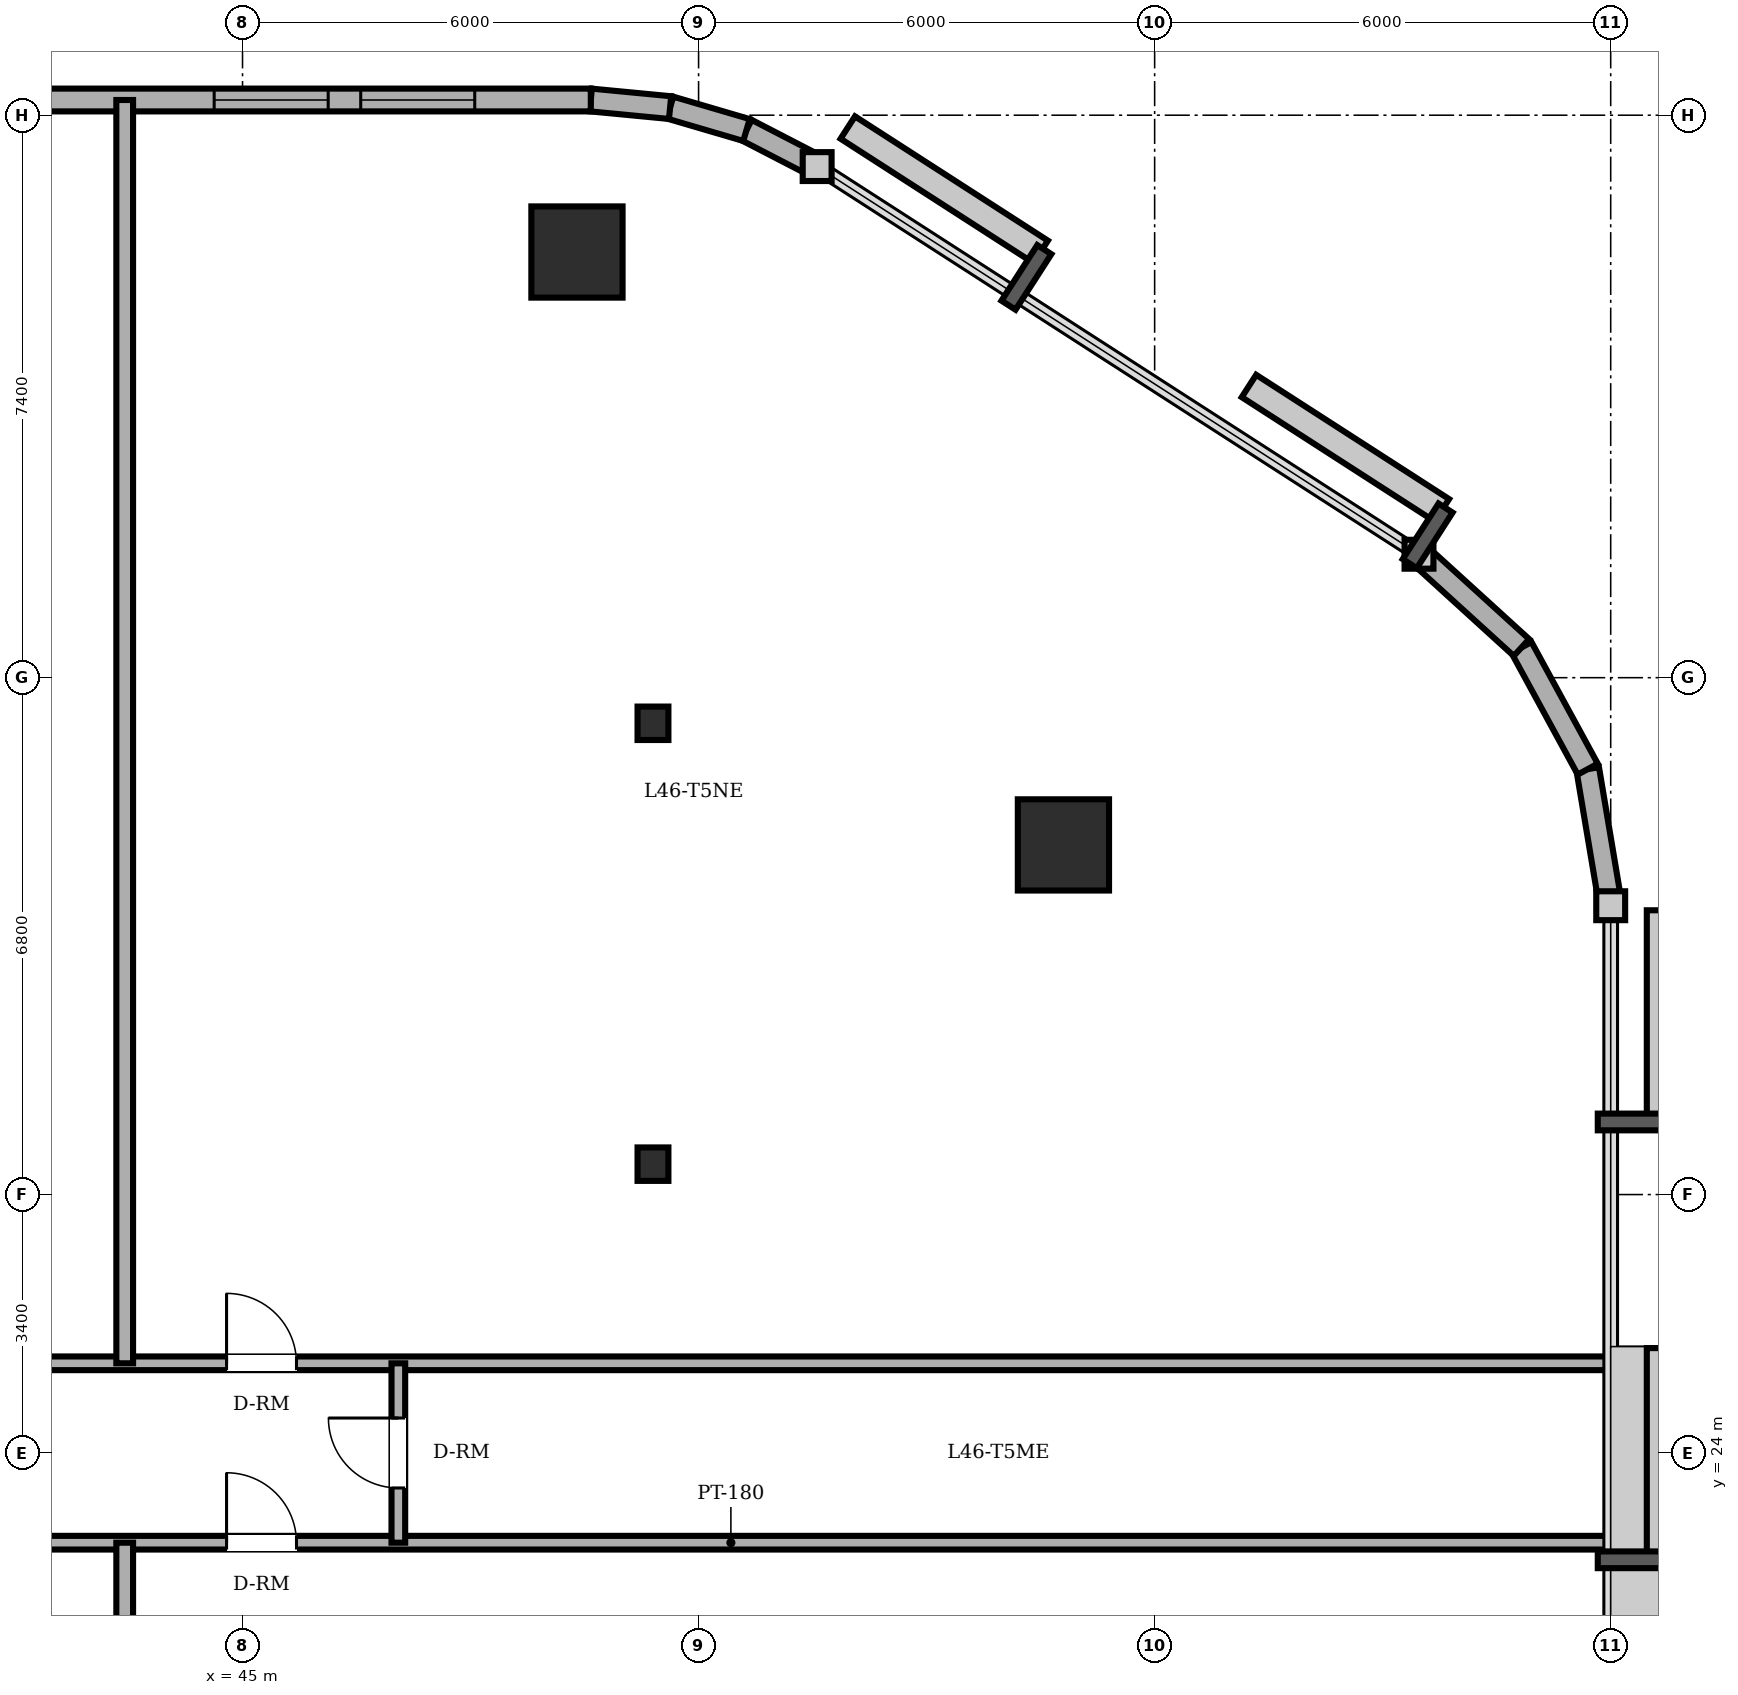
"""IFC4 building model, lengths in metres.
Left out: names, types, materials, properties, quantities, classifications, styles, units other than length and angle.
Written with IfcOpenShell. Run it as: python <this file> out.ifc"""

import sys

from ifc_helpers import new_model, si_unit, direction, frame, frame_2d, origin, origin_2d, place, context, subcontext, project, spatial, rectangle, circle, i_section, extrude, element, fill, save


model = new_model("IFC4")
c1 = context("Model", 3, precision=1e-05, world=origin(), true_north=direction((0.0, 1.0)))
c2 = subcontext(c1, "Body", "Model", "MODEL_VIEW")
j1 = project(units=[si_unit("LENGTHUNIT", "METRE"), si_unit("PLANEANGLEUNIT", "RADIAN")], contexts=[c1])
p1 = place(None, origin())
s1 = spatial("IfcSite", under=j1, at=p1, CompositionType="ELEMENT")
p2 = place(p1, origin())
s2 = spatial("IfcBuilding", under=s1, at=p2, CompositionType="ELEMENT")
p3 = place(p2, frame((0.0, 0.0, 176.2)))
s3 = spatial("IfcBuildingStorey", under=s2, at=p3, CompositionType="ELEMENT", Elevation=176.2)
for number, where, z_axis, x_axis in (
    (1, (55.8, 32.0, 0.0), (0.0, 0.0, 1.0), (1.0, 0.0, 0.0)),
    (2, (49.4, 39.8, 0.0), (0.0, 0.0, 1.0), (1.0, 0.0, 0.0)),
):
    element("IfcColumn", number, at=place(p3, frame(where, z_axis=z_axis, x_axis=x_axis)), inside=s3, PredefinedType="COLUMN", context=c2, shape_type="SweptSolid", body=[
        extrude(circle(Radius=0.6, at=origin_2d()), origin(), (0.0, 0.0, 1.0), 3.6),
    ])
for number, where, z_axis, x_axis in (
    (3, (50.4, 27.8, 0.0), (0.0, 0.0, 1.0), (1.0, 0.0, 0.0)),
    (4, (50.4, 33.6, 0.0), (0.0, 0.0, 1.0), (1.0, 0.0, 0.0)),
):
    element("IfcColumn", number, at=place(p3, frame(where, z_axis=z_axis, x_axis=x_axis)), inside=s3, PredefinedType="COLUMN", context=c2, shape_type="SweptSolid", body=[
        extrude(i_section(OverallWidth=0.406, OverallDepth=0.44, WebThickness=0.024, FlangeThickness=0.039, FilletRadius=0.015, at=origin_2d()), origin(), (0.0, 0.0, 1.0), 3.6),
    ])
p4 = place(p3, frame((63.0, 31.2, 0.0), z_axis=(0.0, 0.0, 1.0), x_axis=(-0.165724081207, 0.986172159873, 0.0)))
e5 = element("IfcWall", 5, at=p4, inside=s3, PredefinedType="SOLIDWALL", context=c2, shape_type="SweptSolid", body=[
    extrude(rectangle(XDim=1.822, YDim=0.3, at=frame_2d((0.911, 0.0))), origin(), (0.0, 0.0, 1.0), 3.4),
])
p5 = place(p3, frame((62.698, 32.997, 0.0), z_axis=(0.0, 0.0, 1.0), x_axis=(-0.478608030646, 0.878028674362, 0.0)))
e6 = element("IfcWall", 6, at=p5, inside=s3, PredefinedType="SOLIDWALL", context=c2, shape_type="SweptSolid", body=[
    extrude(rectangle(XDim=1.822, YDim=0.3, at=frame_2d((0.911, 0.0))), origin(), (0.0, 0.0, 1.0), 3.4),
])
p6 = place(p3, frame((61.826, 34.597, 0.0), z_axis=(0.0, 0.0, 1.0), x_axis=(-0.73947929393, 0.673179302897, 0.0)))
e7 = element("IfcWall", 7, at=p6, inside=s3, PredefinedType="SOLIDWALL", context=c2, shape_type="SweptSolid", body=[
    extrude(rectangle(XDim=1.823, YDim=0.3, at=frame_2d((0.911, 0.0))), origin(), (0.0, 0.0, 1.0), 3.4),
])
p7 = place(p3, frame((52.56, 40.924, 0.0), z_axis=(0.0, 0.0, 1.0), x_axis=(-0.888283247196, 0.459296062198, 0.0)))
e8 = element("IfcWall", 8, at=p7, inside=s3, PredefinedType="SOLIDWALL", context=c2, shape_type="SweptSolid", body=[
    extrude(rectangle(XDim=1.047, YDim=0.3, at=frame_2d((0.523, 0.0))), origin(), (0.0, 0.0, 1.0), 3.4),
])
p8 = place(p3, frame((51.63, 41.405, 0.0), z_axis=(0.0, 0.0, 1.0), x_axis=(-0.959528674476, 0.281610942363, 0.0)))
e9 = element("IfcWall", 9, at=p8, inside=s3, PredefinedType="SOLIDWALL", context=c2, shape_type="SweptSolid", body=[
    extrude(rectangle(XDim=1.047, YDim=0.3, at=frame_2d((0.524, 0.0))), origin(), (0.0, 0.0, 1.0), 3.4),
])
p9 = place(p3, frame((50.625, 41.7, 0.0), z_axis=(0.0, 0.0, 1.0), x_axis=(-0.995426089968, 0.095534807324, 0.0)))
e10 = element("IfcWall", 10, at=p9, inside=s3, PredefinedType="SOLIDWALL", context=c2, shape_type="SweptSolid", body=[
    extrude(rectangle(XDim=1.048, YDim=0.3, at=frame_2d((0.524, 0.0))), origin(), (0.0, 0.0, 1.0), 3.4),
])
p10 = place(p3, frame((49.582, 41.8, 0.0), z_axis=(0.0, 0.0, 1.0), x_axis=(-1.0, 0.0, 0.0)))
e11 = element("IfcWall", 11, at=p10, inside=s3, PredefinedType="SOLIDWALL", context=c2, shape_type="SweptSolid", body=[
    extrude(rectangle(XDim=30.282, YDim=0.3, at=frame_2d((15.141, 0.0))), origin(), (0.0, 0.0, 1.0), 3.4),
])
p11 = place(p10, frame((25.407, 0.0, 0.0)))
e12 = element("IfcOpeningElement", 12, at=p11, cuts=e11, PredefinedType="OPENING", context=c2, shape_type="SweptSolid", body=[
    extrude(rectangle(XDim=0.95, YDim=2.2, at=frame_2d((0.475, 1.1))), frame((0.0, 0.16, 0.0), z_axis=(0.0, -1.0, 0.0), x_axis=(1.0, 0.0, 0.0)), (0.0, 0.0, 1.0), 0.32),
])
p12 = place(p10, frame((1.527, 0.0, 0.85)))
e13 = element("IfcOpeningElement", 13, at=p12, cuts=e11, PredefinedType="OPENING", context=c2, shape_type="SweptSolid", body=[
    extrude(rectangle(XDim=1.5, YDim=1.55, at=frame_2d((0.75, 0.775))), frame((0.0, 0.16, 0.0), z_axis=(0.0, -1.0, 0.0), x_axis=(1.0, 0.0, 0.0)), (0.0, 0.0, 1.0), 0.32),
])
p13 = place(p10, frame((3.455, 0.0, 0.85)))
e14 = element("IfcOpeningElement", 14, at=p13, cuts=e11, PredefinedType="OPENING", context=c2, shape_type="SweptSolid", body=[
    extrude(rectangle(XDim=1.5, YDim=1.55, at=frame_2d((0.75, 0.775))), frame((0.0, 0.16, 0.0), z_axis=(0.0, -1.0, 0.0), x_axis=(1.0, 0.0, 0.0)), (0.0, 0.0, 1.0), 0.32),
])
p14 = place(p10, frame((7.182, 0.0, 0.85)))
e15 = element("IfcOpeningElement", 15, at=p14, cuts=e11, PredefinedType="OPENING", context=c2, shape_type="SweptSolid", body=[
    extrude(rectangle(XDim=1.5, YDim=1.55, at=frame_2d((0.75, 0.775))), frame((0.0, 0.16, 0.0), z_axis=(0.0, -1.0, 0.0), x_axis=(1.0, 0.0, 0.0)), (0.0, 0.0, 1.0), 0.32),
])
p15 = place(p10, frame((11.665, 0.0, 0.85)))
e16 = element("IfcOpeningElement", 16, at=p15, cuts=e11, PredefinedType="OPENING", context=c2, shape_type="SweptSolid", body=[
    extrude(rectangle(XDim=1.5, YDim=1.55, at=frame_2d((0.75, 0.775))), frame((0.0, 0.16, 0.0), z_axis=(0.0, -1.0, 0.0), x_axis=(1.0, 0.0, 0.0)), (0.0, 0.0, 1.0), 0.32),
])
p16 = place(p10, frame((14.349, 0.0, 0.85)))
e17 = element("IfcOpeningElement", 17, at=p16, cuts=e11, PredefinedType="OPENING", context=c2, shape_type="SweptSolid", body=[
    extrude(rectangle(XDim=1.5, YDim=1.55, at=frame_2d((0.75, 0.775))), frame((0.0, 0.16, 0.0), z_axis=(0.0, -1.0, 0.0), x_axis=(1.0, 0.0, 0.0)), (0.0, 0.0, 1.0), 0.32),
])
p17 = place(p10, frame((18.932, 0.0, 0.85)))
e18 = element("IfcOpeningElement", 18, at=p17, cuts=e11, PredefinedType="OPENING", context=c2, shape_type="SweptSolid", body=[
    extrude(rectangle(XDim=1.5, YDim=1.55, at=frame_2d((0.75, 0.775))), frame((0.0, 0.16, 0.0), z_axis=(0.0, -1.0, 0.0), x_axis=(1.0, 0.0, 0.0)), (0.0, 0.0, 1.0), 0.32),
])
p18 = place(p10, frame((22.532, 0.0, 0.85)))
e19 = element("IfcOpeningElement", 19, at=p18, cuts=e11, PredefinedType="OPENING", context=c2, shape_type="SweptSolid", body=[
    extrude(rectangle(XDim=1.5, YDim=1.55, at=frame_2d((0.75, 0.775))), frame((0.0, 0.16, 0.0), z_axis=(0.0, -1.0, 0.0), x_axis=(1.0, 0.0, 0.0)), (0.0, 0.0, 1.0), 0.32),
])
p19 = place(p10, frame((27.532, 0.0, 0.85)))
e20 = element("IfcOpeningElement", 20, at=p19, cuts=e11, PredefinedType="OPENING", context=c2, shape_type="SweptSolid", body=[
    extrude(rectangle(XDim=1.5, YDim=1.55, at=frame_2d((0.75, 0.775))), frame((0.0, 0.16, 0.0), z_axis=(0.0, -1.0, 0.0), x_axis=(1.0, 0.0, 0.0)), (0.0, 0.0, 1.0), 0.32),
])
p20 = place(p3, frame((39.85, 22.82, 0.0), z_axis=(0.0, 0.0, 1.0), x_axis=(1.0, 0.0, 0.0)))
e21 = element("IfcWall", 21, at=p20, inside=s3, PredefinedType="PARTITIONING", context=c2, shape_type="SweptSolid", body=[
    extrude(rectangle(XDim=23.15, YDim=0.18, at=frame_2d((11.575, 0.0))), origin(), (0.0, 0.0, 1.0), 3.4),
])
p21 = place(p20, frame((4.94, 0.0, 0.0)))
e22 = element("IfcOpeningElement", 22, at=p21, cuts=e21, PredefinedType="OPENING", context=c2, shape_type="SweptSolid", body=[
    extrude(rectangle(XDim=0.92, YDim=2.1, at=frame_2d((0.46, 1.05))), frame((0.0, 0.1, 0.0), z_axis=(0.0, -1.0, 0.0), x_axis=(1.0, 0.0, 0.0)), (0.0, 0.0, 1.0), 0.2),
])
p22 = place(p3, frame((39.85, 25.18, 0.0), z_axis=(0.0, 0.0, 1.0), x_axis=(1.0, 0.0, 0.0)))
e23 = element("IfcWall", 23, at=p22, inside=s3, PredefinedType="PARTITIONING", context=c2, shape_type="SweptSolid", body=[
    extrude(rectangle(XDim=23.15, YDim=0.18, at=frame_2d((11.575, 0.0))), origin(), (0.0, 0.0, 1.0), 3.4),
])
p23 = place(p22, frame((4.94, 0.0, 0.0)))
e24 = element("IfcOpeningElement", 24, at=p23, cuts=e23, PredefinedType="OPENING", context=c2, shape_type="SweptSolid", body=[
    extrude(rectangle(XDim=0.92, YDim=2.1, at=frame_2d((0.46, 1.05))), frame((0.0, 0.1, 0.0), z_axis=(0.0, -1.0, 0.0), x_axis=(1.0, 0.0, 0.0)), (0.0, 0.0, 1.0), 0.2),
])
for number, where, z_axis, x_axis in (
    (25, (43.45, 6.2, 0.0), (0.0, 0.0, 1.0), (0.0, 1.0, 0.0)),
    (26, (43.45, 25.18, 0.0), (0.0, 0.0, 1.0), (0.0, 1.0, 0.0)),
):
    element("IfcWall", number, at=place(p3, frame(where, z_axis=z_axis, x_axis=x_axis)), inside=s3, PredefinedType="PARTITIONING", context=c2, shape_type="SweptSolid", body=[
        extrude(rectangle(XDim=16.62, YDim=0.22, at=frame_2d((8.31, 0.0))), origin(), (0.0, 0.0, 1.0), 3.4),
    ])
p24 = place(p3, frame((47.05, 22.82, 0.0), z_axis=(0.0, 0.0, 1.0), x_axis=(0.0, 1.0, 0.0)))
e27 = element("IfcWall", 27, at=p24, inside=s3, PredefinedType="PARTITIONING", context=c2, shape_type="SweptSolid", body=[
    extrude(rectangle(XDim=2.36, YDim=0.18, at=frame_2d((1.18, 0.0))), origin(), (0.0, 0.0, 1.0), 3.4),
])
p25 = place(p24, frame((0.72, 0.0, 0.0)))
e28 = element("IfcOpeningElement", 28, at=p25, cuts=e27, PredefinedType="OPENING", context=c2, shape_type="SweptSolid", body=[
    extrude(rectangle(XDim=0.92, YDim=2.1, at=frame_2d((0.46, 1.05))), frame((0.0, 0.1, 0.0), z_axis=(0.0, -1.0, 0.0), x_axis=(1.0, 0.0, 0.0)), (0.0, 0.0, 1.0), 0.2),
])
p26 = place(p12, origin())
e29 = element("IfcWindow", 29, at=p26, inside=s3, PartitioningType="DOUBLE_PANEL_VERTICAL", PredefinedType="WINDOW", context=c2, shape_type="SweptSolid", body=[
    extrude(rectangle(XDim=1.5, YDim=1.55, at=frame_2d((0.75, 0.775))), frame((0.0, 0.03, 0.0), z_axis=(0.0, -1.0, 0.0), x_axis=(1.0, 0.0, 0.0)), (0.0, 0.0, 1.0), 0.06),
])
fill(e13, e29)
p27 = place(p13, origin())
e30 = element("IfcWindow", 30, at=p27, inside=s3, PartitioningType="DOUBLE_PANEL_VERTICAL", PredefinedType="WINDOW", context=c2, shape_type="SweptSolid", body=[
    extrude(rectangle(XDim=1.5, YDim=1.55, at=frame_2d((0.75, 0.775))), frame((0.0, 0.03, 0.0), z_axis=(0.0, -1.0, 0.0), x_axis=(1.0, 0.0, 0.0)), (0.0, 0.0, 1.0), 0.06),
])
fill(e14, e30)
p28 = place(p23, origin())
e31 = element("IfcDoor", 31, at=p28, inside=s3, OperationType="SINGLE_SWING_LEFT", PredefinedType="DOOR", context=c2, shape_type="SweptSolid", body=[
    extrude(rectangle(XDim=0.92, YDim=2.1, at=frame_2d((0.46, 1.05))), frame((0.0, 0.025, 0.0), z_axis=(0.0, -1.0, 0.0), x_axis=(1.0, 0.0, 0.0)), (0.0, 0.0, 1.0), 0.05),
])
fill(e24, e31)
p29 = place(p25, origin())
e32 = element("IfcDoor", 32, at=p29, inside=s3, OperationType="SINGLE_SWING_RIGHT", PredefinedType="DOOR", context=c2, shape_type="SweptSolid", body=[
    extrude(rectangle(XDim=0.92, YDim=2.1, at=frame_2d((0.46, 1.05))), frame((0.0, 0.025, 0.0), z_axis=(0.0, -1.0, 0.0), x_axis=(1.0, 0.0, 0.0)), (0.0, 0.0, 1.0), 0.05),
])
fill(e28, e32)
p30 = place(p21, origin())
e33 = element("IfcDoor", 33, at=p30, inside=s3, OperationType="SINGLE_SWING_LEFT", PredefinedType="DOOR", context=c2, shape_type="SweptSolid", body=[
    extrude(rectangle(XDim=0.92, YDim=2.1, at=frame_2d((0.46, 1.05))), frame((0.0, 0.025, 0.0), z_axis=(0.0, -1.0, 0.0), x_axis=(1.0, 0.0, 0.0)), (0.0, 0.0, 1.0), 0.05),
])
fill(e22, e33)
save(model, sys.argv[1])
